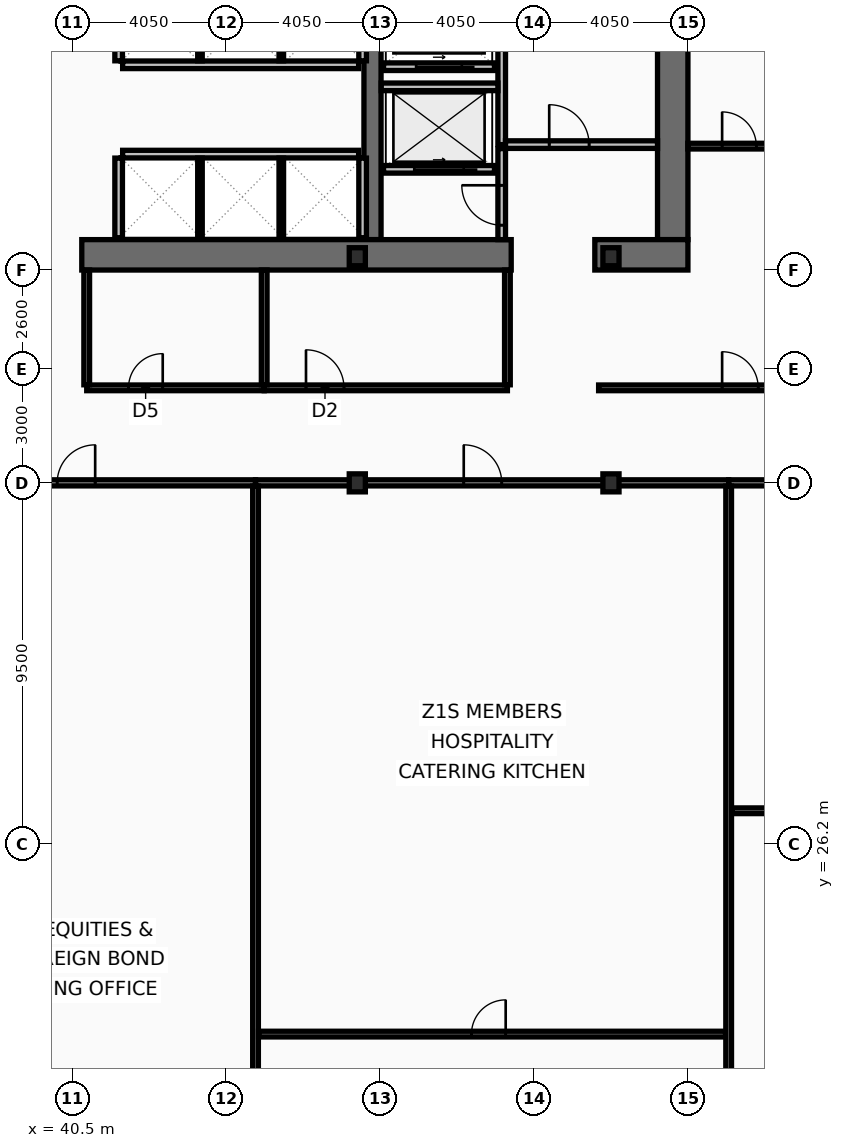
"""IFC4 building model, lengths in metres.
Left out: names, types, materials, properties, quantities, classifications, styles, units other than length and angle.
Written with IfcOpenShell. Run it as: python <this file> out.ifc"""

import sys

from ifc_helpers import new_model, si_unit, direction, frame, frame_2d, origin, origin_2d, place, context, subcontext, project, spatial, rectangle, i_section, extrude, element, fill, save


model = new_model("IFC4")
c1 = context("Model", 3, precision=1e-05, world=origin(), true_north=direction((0.0, 1.0)))
c2 = subcontext(c1, "Body", "Model", "MODEL_VIEW")
j1 = project(units=[si_unit("LENGTHUNIT", "METRE"), si_unit("PLANEANGLEUNIT", "RADIAN")], contexts=[c1])
p1 = place(None, origin())
s1 = spatial("IfcSite", under=j1, at=p1, CompositionType="ELEMENT")
p2 = place(p1, origin())
s2 = spatial("IfcBuilding", under=s1, at=p2, CompositionType="ELEMENT")
p3 = place(p2, frame((0.0, 0.0, 37.8)))
s3 = spatial("IfcBuildingStorey", under=s2, at=p3, CompositionType="ELEMENT", Elevation=37.8)
p4 = place(p3, frame((56.3, 52.9, 0.0), z_axis=(0.0, 0.0, 1.0), x_axis=(0.0, -1.0, 0.0)))
e1 = element("IfcWall", 1, at=p4, inside=s3, PredefinedType="SHEAR", context=c2, shape_type="SweptSolid", body=[
    extrude(rectangle(XDim=10.8, YDim=0.8, at=frame_2d((5.4, 0.0))), origin(), (0.0, 0.0, 1.0), 3.82),
])
p5 = place(p3, frame((48.4, 42.1, 0.0), z_axis=(0.0, 0.0, 1.0), x_axis=(0.0, 1.0, 0.0)))
e2 = element("IfcWall", 2, at=p5, inside=s3, PredefinedType="SHEAR", context=c2, shape_type="SweptSolid", body=[
    extrude(rectangle(XDim=10.8, YDim=0.45, at=frame_2d((5.4, 0.0))), origin(), (0.0, 0.0, 1.0), 3.82),
])
p6 = place(p3, frame((52.05, 41.7, 0.0), z_axis=(0.0, 0.0, 1.0), x_axis=(-1.0, 0.0, 0.0)))
e3 = element("IfcWall", 3, at=p6, inside=s3, PredefinedType="SHEAR", context=c2, shape_type="SweptSolid", body=[
    extrude(rectangle(XDim=11.3, YDim=0.8, at=frame_2d((5.65, 0.0))), origin(), (0.0, 0.0, 1.0), 3.82),
])
p7 = place(p3, frame((56.7, 41.7, 0.0), z_axis=(0.0, 0.0, 1.0), x_axis=(-1.0, 0.0, 0.0)))
e4 = element("IfcWall", 4, at=p7, inside=s3, PredefinedType="SHEAR", context=c2, shape_type="SweptSolid", body=[
    extrude(rectangle(XDim=2.45, YDim=0.8, at=frame_2d((1.225, 0.0))), origin(), (0.0, 0.0, 1.0), 3.82),
])
for number, where, z_axis, x_axis in (
    (5, (48.0, 35.7, 0.0), (0.0, 0.0, 1.0), (1.0, 0.0, 0.0)),
    (6, (48.0, 41.65, 0.0), (0.0, 0.0, 1.0), (1.0, 0.0, 0.0)),
    (7, (54.675, 35.7, 0.0), (0.0, 0.0, 1.0), (1.0, 0.0, 0.0)),
    (8, (54.675, 41.65, 0.0), (0.0, 0.0, 1.0), (1.0, 0.0, 0.0)),
):
    element("IfcColumn", number, at=place(p3, frame(where, z_axis=z_axis, x_axis=x_axis)), inside=s3, PredefinedType="COLUMN", context=c2, shape_type="SweptSolid", body=[
        extrude(i_section(OverallWidth=0.424, OverallDepth=0.474, WebThickness=0.048, FlangeThickness=0.077, at=origin_2d()), origin(), (0.0, 0.0, 1.0), 4.0),
    ])
p8 = place(p3, frame((51.61, 43.95, 0.0), z_axis=(0.0, 0.0, 1.0), x_axis=(-1.0, 0.0, 0.0)))
e9 = element("IfcWall", 9, at=p8, inside=s3, PredefinedType="PARTITIONING", context=c2, shape_type="SweptSolid", body=[
    extrude(rectangle(XDim=2.92, YDim=0.2, at=frame_2d((1.46, 0.0))), origin(), (0.0, 0.0, 1.0), 3.82),
])
p9 = place(p8, frame((0.81, 0.0, 0.0)))
e10 = element("IfcOpeningElement", 10, at=p9, cuts=e9, PredefinedType="OPENING", context=c2, shape_type="SweptSolid", body=[
    extrude(rectangle(XDim=1.3, YDim=2.18, at=frame_2d((0.65, 1.09))), frame((0.0, 0.11, 0.0), z_axis=(0.0, -1.0, 0.0), x_axis=(1.0, 0.0, 0.0)), (0.0, 0.0, 1.0), 0.22),
])
p10 = place(p3, frame((51.61, 46.65, 0.0), z_axis=(0.0, 0.0, 1.0), x_axis=(-1.0, 0.0, 0.0)))
e11 = element("IfcWall", 11, at=p10, inside=s3, PredefinedType="PARTITIONING", context=c2, shape_type="SweptSolid", body=[
    extrude(rectangle(XDim=2.92, YDim=0.2, at=frame_2d((1.46, 0.0))), origin(), (0.0, 0.0, 1.0), 3.82),
])
p11 = place(p10, frame((0.86, 0.0, 0.0)))
e12 = element("IfcOpeningElement", 12, at=p11, cuts=e11, PredefinedType="OPENING", context=c2, shape_type="SweptSolid", body=[
    extrude(rectangle(XDim=1.2, YDim=2.18, at=frame_2d((0.6, 1.09))), frame((0.0, 0.11, 0.0), z_axis=(0.0, -1.0, 0.0), x_axis=(1.0, 0.0, 0.0)), (0.0, 0.0, 1.0), 0.22),
])
p12 = place(p3, frame((51.8, 44.6, 0.0), z_axis=(0.0, 0.0, 1.0), x_axis=(0.0, 1.0, 0.0)))
e13 = element("IfcWall", 13, at=p12, inside=s3, PredefinedType="PARTITIONING", context=c2, shape_type="SweptSolid", body=[
    extrude(rectangle(XDim=4.3, YDim=0.2, at=frame_2d((2.15, 0.0))), origin(), (0.0, 0.0, 1.0), 3.82),
])
p13 = place(p3, frame((51.9, 44.6, 0.0), z_axis=(0.0, 0.0, 1.0), x_axis=(1.0, 0.0, 0.0)))
e14 = element("IfcWall", 14, at=p13, inside=s3, PredefinedType="PARTITIONING", context=c2, shape_type="SweptSolid", body=[
    extrude(rectangle(XDim=4.0, YDim=0.2, at=frame_2d((2.0, 0.0))), origin(), (0.0, 0.0, 1.0), 3.82),
])
p14 = place(p13, frame((1.15, 0.0, 0.0)))
e15 = element("IfcOpeningElement", 15, at=p14, cuts=e14, PredefinedType="OPENING", context=c2, shape_type="SweptSolid", body=[
    extrude(rectangle(XDim=1.05, YDim=2.15, at=frame_2d((0.525, 1.075))), frame((0.0, 0.11, 0.0), z_axis=(0.0, -1.0, 0.0), x_axis=(1.0, 0.0, 0.0)), (0.0, 0.0, 1.0), 0.22),
])
p15 = place(p3, frame((48.63, 46.12, 0.0), z_axis=(0.0, 0.0, 1.0), x_axis=(1.0, 0.0, 0.0)))
e16 = element("IfcWall", 16, at=p15, inside=s3, PredefinedType="PARTITIONING", context=c2, shape_type="SweptSolid", body=[
    extrude(rectangle(XDim=3.07, YDim=0.2, at=frame_2d((1.535, 0.0))), origin(), (0.0, 0.0, 1.0), 3.82),
])
p16 = place(p3, frame((51.8, 42.1, 0.0), z_axis=(0.0, 0.0, 1.0), x_axis=(0.0, 1.0, 0.0)))
e17 = element("IfcWall", 17, at=p16, inside=s3, PredefinedType="PARTITIONING", context=c2, shape_type="SweptSolid", body=[
    extrude(rectangle(XDim=2.395, YDim=0.2, at=frame_2d((1.198, 0.0))), origin(), (0.0, 0.0, 1.0), 3.82),
])
p17 = place(p16, frame((0.38, 0.0, 0.0)))
e18 = element("IfcOpeningElement", 18, at=p17, cuts=e17, PredefinedType="OPENING", context=c2, shape_type="SweptSolid", body=[
    extrude(rectangle(XDim=1.05, YDim=2.15, at=frame_2d((0.525, 1.075))), frame((0.0, 0.11, 0.0), z_axis=(0.0, -1.0, 0.0), x_axis=(1.0, 0.0, 0.0)), (0.0, 0.0, 1.0), 0.22),
])
p18 = place(p3, frame((41.825, 46.7, 0.0), z_axis=(0.0, 0.0, 1.0), x_axis=(1.0, 0.0, 0.0)))
e19 = element("IfcWall", 19, at=p18, inside=s3, PredefinedType="PARTITIONING", context=c2, shape_type="SweptSolid", body=[
    extrude(rectangle(XDim=6.21, YDim=0.2, at=frame_2d((3.105, 0.0))), origin(), (0.0, 0.0, 1.0), 3.82),
])
for number, where, z_axis, x_axis in (
    (20, (41.72, 46.805, 0.0), (0.0, 0.0, 1.0), (0.0, 1.0, 0.0)),
    (21, (48.14, 46.805, 0.0), (0.0, 0.0, 1.0), (0.0, 1.0, 0.0)),
):
    element("IfcWall", number, at=place(p3, frame(where, z_axis=z_axis, x_axis=x_axis)), inside=s3, PredefinedType="PARTITIONING", context=c2, shape_type="SweptSolid", body=[
        extrude(rectangle(XDim=2.09, YDim=0.2, at=frame_2d((1.045, 0.0))), origin(), (0.0, 0.0, 1.0), 3.82),
    ])
for number, where, z_axis, x_axis in (
    (22, (43.86, 46.805, 0.0), (0.0, 0.0, 1.0), (0.0, 1.0, 0.0)),
    (23, (46.0, 46.805, 0.0), (0.0, 0.0, 1.0), (0.0, 1.0, 0.0)),
):
    element("IfcWall", number, at=place(p3, frame(where, z_axis=z_axis, x_axis=x_axis)), inside=s3, PredefinedType="PARTITIONING", context=c2, shape_type="SweptSolid", body=[
        extrude(rectangle(XDim=2.09, YDim=0.12, at=frame_2d((1.045, 0.0))), origin(), (0.0, 0.0, 1.0), 3.82),
    ])
p19 = place(p3, frame((41.825, 44.35, 0.0), z_axis=(0.0, 0.0, 1.0), x_axis=(1.0, 0.0, 0.0)))
e24 = element("IfcWall", 24, at=p19, inside=s3, PredefinedType="PARTITIONING", context=c2, shape_type="SweptSolid", body=[
    extrude(rectangle(XDim=6.21, YDim=0.2, at=frame_2d((3.105, 0.0))), origin(), (0.0, 0.0, 1.0), 3.82),
])
for number, where, z_axis, x_axis in (
    (25, (41.72, 42.15, 0.0), (0.0, 0.0, 1.0), (0.0, 1.0, 0.0)),
    (26, (48.14, 42.15, 0.0), (0.0, 0.0, 1.0), (0.0, 1.0, 0.0)),
):
    element("IfcWall", number, at=place(p3, frame(where, z_axis=z_axis, x_axis=x_axis)), inside=s3, PredefinedType="PARTITIONING", context=c2, shape_type="SweptSolid", body=[
        extrude(rectangle(XDim=2.095, YDim=0.2, at=frame_2d((1.048, 0.0))), origin(), (0.0, 0.0, 1.0), 3.82),
    ])
for number, where, z_axis, x_axis in (
    (27, (43.86, 42.15, 0.0), (0.0, 0.0, 1.0), (0.0, 1.0, 0.0)),
    (28, (46.0, 42.15, 0.0), (0.0, 0.0, 1.0), (0.0, 1.0, 0.0)),
):
    element("IfcWall", number, at=place(p3, frame(where, z_axis=z_axis, x_axis=x_axis)), inside=s3, PredefinedType="PARTITIONING", context=c2, shape_type="SweptSolid", body=[
        extrude(rectangle(XDim=2.095, YDim=0.12, at=frame_2d((1.048, 0.0))), origin(), (0.0, 0.0, 1.0), 3.82),
    ])
p20 = place(p3, frame((40.88, 38.2, 0.0), z_axis=(0.0, 0.0, 1.0), x_axis=(1.0, 0.0, 0.0)))
e29 = element("IfcWall", 29, at=p20, inside=s3, PredefinedType="PARTITIONING", context=c2, shape_type="SweptSolid", body=[
    extrude(rectangle(XDim=4.67, YDim=0.15, at=frame_2d((2.335, 0.0))), origin(), (0.0, 0.0, 1.0), 3.01),
])
p21 = place(p20, frame((1.1, 0.0, 0.0)))
e30 = element("IfcOpeningElement", 30, at=p21, cuts=e29, PredefinedType="OPENING", context=c2, shape_type="SweptSolid", body=[
    extrude(rectangle(XDim=0.9, YDim=2.05, at=frame_2d((0.45, 1.025))), frame((0.0, 0.085, 0.0), z_axis=(0.0, -1.0, 0.0), x_axis=(1.0, 0.0, 0.0)), (0.0, 0.0, 1.0), 0.17),
])
p22 = place(p3, frame((45.55, 38.2, 0.0), z_axis=(0.0, 0.0, 1.0), x_axis=(1.0, 0.0, 0.0)))
e31 = element("IfcWall", 31, at=p22, inside=s3, PredefinedType="PARTITIONING", context=c2, shape_type="SweptSolid", body=[
    extrude(rectangle(XDim=6.4, YDim=0.15, at=frame_2d((3.2, 0.0))), origin(), (0.0, 0.0, 1.0), 3.01),
])
p23 = place(p22, frame((1.1, 0.0, 0.0)))
e32 = element("IfcOpeningElement", 32, at=p23, cuts=e31, PredefinedType="OPENING", context=c2, shape_type="SweptSolid", body=[
    extrude(rectangle(XDim=1.0, YDim=2.05, at=frame_2d((0.5, 1.025))), frame((0.0, 0.085, 0.0), z_axis=(0.0, -1.0, 0.0), x_axis=(1.0, 0.0, 0.0)), (0.0, 0.0, 1.0), 0.17),
])
for number, where, z_axis, x_axis in (
    (33, (40.88, 38.28, 0.0), (0.0, 0.0, 1.0), (0.0, 1.0, 0.0)),
    (34, (45.55, 38.28, 0.0), (0.0, 0.0, 1.0), (0.0, 1.0, 0.0)),
    (35, (51.95, 38.28, 0.0), (0.0, 0.0, 1.0), (0.0, 1.0, 0.0)),
):
    element("IfcWall", number, at=place(p3, frame(where, z_axis=z_axis, x_axis=x_axis)), inside=s3, PredefinedType="PARTITIONING", context=c2, shape_type="SweptSolid", body=[
        extrude(rectangle(XDim=3.02, YDim=0.15, at=frame_2d((1.51, 0.0))), origin(), (0.0, 0.0, 1.0), 3.82),
    ])
p24 = place(p3, frame((54.35, 38.2, 0.0), z_axis=(0.0, 0.0, 1.0), x_axis=(1.0, 0.0, 0.0)))
e36 = element("IfcWall", 36, at=p24, inside=s3, PredefinedType="PARTITIONING", context=c2, shape_type="SweptSolid", body=[
    extrude(rectangle(XDim=16.52, YDim=0.15, at=frame_2d((8.26, 0.0))), origin(), (0.0, 0.0, 1.0), 3.01),
])
p25 = place(p24, frame((3.25, 0.0, 0.0)))
e37 = element("IfcOpeningElement", 37, at=p25, cuts=e36, PredefinedType="OPENING", context=c2, shape_type="SweptSolid", body=[
    extrude(rectangle(XDim=0.95, YDim=2.05, at=frame_2d((0.475, 1.025))), frame((0.0, 0.085, 0.0), z_axis=(0.0, -1.0, 0.0), x_axis=(1.0, 0.0, 0.0)), (0.0, 0.0, 1.0), 0.17),
])
p26 = place(p3, frame((56.7, 44.56, 0.0), z_axis=(0.0, 0.0, 1.0), x_axis=(1.0, 0.0, 0.0)))
e38 = element("IfcWall", 38, at=p26, inside=s3, PredefinedType="PARTITIONING", context=c2, shape_type="SweptSolid", body=[
    extrude(rectangle(XDim=14.105, YDim=0.15, at=frame_2d((7.052, 0.0))), origin(), (0.0, 0.0, 1.0), 3.16),
])
p27 = place(p26, frame((0.9, 0.0, 0.0)))
e39 = element("IfcOpeningElement", 39, at=p27, cuts=e38, PredefinedType="OPENING", context=c2, shape_type="SweptSolid", body=[
    extrude(rectangle(XDim=0.9, YDim=2.05, at=frame_2d((0.45, 1.025))), frame((0.0, 0.085, 0.0), z_axis=(0.0, -1.0, 0.0), x_axis=(1.0, 0.0, 0.0)), (0.0, 0.0, 1.0), 0.17),
])
p28 = place(p3, frame((35.892, 35.7, 0.0), z_axis=(0.0, 0.0, 1.0), x_axis=(1.0, 0.0, 0.0)))
e40 = element("IfcWall", 40, at=p28, inside=s3, PredefinedType="PARTITIONING", context=c2, shape_type="SweptSolid", body=[
    extrude(rectangle(XDim=9.43, YDim=0.16, at=frame_2d((4.715, 0.0))), origin(), (0.0, 0.0, 1.0), 3.01),
])
p29 = place(p28, frame((4.211, 0.0, 0.0)))
e41 = element("IfcOpeningElement", 41, at=p29, cuts=e40, PredefinedType="OPENING", context=c2, shape_type="SweptSolid", body=[
    extrude(rectangle(XDim=1.0, YDim=2.05, at=frame_2d((0.5, 1.025))), frame((0.0, 0.09, 0.0), z_axis=(0.0, -1.0, 0.0), x_axis=(1.0, 0.0, 0.0)), (0.0, 0.0, 1.0), 0.18),
])
p30 = place(p3, frame((45.322, 35.7, 0.0), z_axis=(0.0, 0.0, 1.0), x_axis=(1.0, 0.0, 0.0)))
e42 = element("IfcWall", 42, at=p30, inside=s3, PredefinedType="PARTITIONING", context=c2, shape_type="SweptSolid", body=[
    extrude(rectangle(XDim=12.45, YDim=0.16, at=frame_2d((6.225, 0.0))), origin(), (0.0, 0.0, 1.0), 3.01),
])
p31 = place(p30, frame((5.479, 0.0, 0.0)))
e43 = element("IfcOpeningElement", 43, at=p31, cuts=e42, PredefinedType="OPENING", context=c2, shape_type="SweptSolid", body=[
    extrude(rectangle(XDim=1.0, YDim=2.05, at=frame_2d((0.5, 1.025))), frame((0.0, 0.09, 0.0), z_axis=(0.0, -1.0, 0.0), x_axis=(1.0, 0.0, 0.0)), (0.0, 0.0, 1.0), 0.18),
])
p32 = place(p3, frame((45.322, 10.665, 0.0), z_axis=(0.0, 0.0, 1.0), x_axis=(0.0, 1.0, 0.0)))
e44 = element("IfcWall", 44, at=p32, inside=s3, PredefinedType="PARTITIONING", context=c2, shape_type="SweptSolid", body=[
    extrude(rectangle(XDim=24.95, YDim=0.15, at=frame_2d((12.475, 0.0))), origin(), (0.0, 0.0, 1.0), 3.21),
])
p33 = place(p3, frame((45.402, 21.196, 0.0), z_axis=(0.0, 0.0, 1.0), x_axis=(1.0, 0.0, 0.0)))
e45 = element("IfcWall", 45, at=p33, inside=s3, PredefinedType="PARTITIONING", context=c2, shape_type="SweptSolid", body=[
    extrude(rectangle(XDim=12.29, YDim=0.15, at=frame_2d((6.145, 0.0))), origin(), (0.0, 0.0, 1.0), 3.01),
])
p34 = place(p33, frame((5.603, 0.0, 0.0)))
e46 = element("IfcOpeningElement", 46, at=p34, cuts=e45, PredefinedType="OPENING", context=c2, shape_type="SweptSolid", body=[
    extrude(rectangle(XDim=0.9, YDim=2.05, at=frame_2d((0.45, 1.025))), frame((0.0, 0.085, 0.0), z_axis=(0.0, -1.0, 0.0), x_axis=(1.0, 0.0, 0.0)), (0.0, 0.0, 1.0), 0.17),
])
p35 = place(p3, frame((57.772, 35.7, 0.0), z_axis=(0.0, 0.0, 1.0), x_axis=(1.0, 0.0, 0.0)))
e47 = element("IfcWall", 47, at=p35, inside=s3, PredefinedType="PARTITIONING", context=c2, shape_type="SweptSolid", body=[
    extrude(rectangle(XDim=13.098, YDim=0.16, at=frame_2d((6.549, 0.0))), origin(), (0.0, 0.0, 1.0), 3.01),
])
p36 = place(p35, frame((5.751, 0.0, 0.0)))
e48 = element("IfcOpeningElement", 48, at=p36, cuts=e47, PredefinedType="OPENING", context=c2, shape_type="SweptSolid", body=[
    extrude(rectangle(XDim=1.0, YDim=2.05, at=frame_2d((0.5, 1.025))), frame((0.0, 0.09, 0.0), z_axis=(0.0, -1.0, 0.0), x_axis=(1.0, 0.0, 0.0)), (0.0, 0.0, 1.0), 0.18),
])
p37 = place(p3, frame((57.772, 10.665, 0.0), z_axis=(0.0, 0.0, 1.0), x_axis=(0.0, 1.0, 0.0)))
e49 = element("IfcWall", 49, at=p37, inside=s3, PredefinedType="PARTITIONING", context=c2, shape_type="SweptSolid", body=[
    extrude(rectangle(XDim=24.95, YDim=0.15, at=frame_2d((12.475, 0.0))), origin(), (0.0, 0.0, 1.0), 3.01),
])
p38 = place(p3, frame((57.852, 27.072, 0.0), z_axis=(0.0, 0.0, 1.0), x_axis=(1.0, 0.0, 0.0)))
e50 = element("IfcWall", 50, at=p38, inside=s3, PredefinedType="PARTITIONING", context=c2, shape_type="SweptSolid", body=[
    extrude(rectangle(XDim=12.953, YDim=0.15, at=frame_2d((6.477, 0.0))), origin(), (0.0, 0.0, 1.0), 3.82),
])
p39 = place(p38, frame((5.894, 0.0, 0.0)))
e51 = element("IfcOpeningElement", 51, at=p39, cuts=e50, PredefinedType="OPENING", context=c2, shape_type="SweptSolid", body=[
    extrude(rectangle(XDim=0.9, YDim=2.05, at=frame_2d((0.45, 1.025))), frame((0.0, 0.085, 0.0), z_axis=(0.0, -1.0, 0.0), x_axis=(1.0, 0.0, 0.0)), (0.0, 0.0, 1.0), 0.17),
])
p40 = place(p9, origin())
e52 = element("IfcDoor", 52, at=p40, inside=s3, OperationType="SLIDING_TO_LEFT", PredefinedType="DOOR", context=c2, shape_type="SweptSolid", body=[
    extrude(rectangle(XDim=1.3, YDim=2.18, at=frame_2d((0.65, 1.09))), frame((0.0, 0.025, 0.0), z_axis=(0.0, -1.0, 0.0), x_axis=(1.0, 0.0, 0.0)), (0.0, 0.0, 1.0), 0.05),
])
fill(e10, e52)
p41 = place(p11, origin())
e53 = element("IfcDoor", 53, at=p41, inside=s3, OperationType="SLIDING_TO_LEFT", PredefinedType="DOOR", context=c2, shape_type="SweptSolid", body=[
    extrude(rectangle(XDim=1.2, YDim=2.18, at=frame_2d((0.6, 1.09))), frame((0.0, 0.025, 0.0), z_axis=(0.0, -1.0, 0.0), x_axis=(1.0, 0.0, 0.0)), (0.0, 0.0, 1.0), 0.05),
])
fill(e12, e53)
p42 = place(p14, origin())
e54 = element("IfcDoor", 54, at=p42, inside=s3, OperationType="SINGLE_SWING_LEFT", PredefinedType="DOOR", context=c2, shape_type="SweptSolid", body=[
    extrude(rectangle(XDim=1.05, YDim=2.15, at=frame_2d((0.525, 1.075))), frame((0.0, 0.025, 0.0), z_axis=(0.0, -1.0, 0.0), x_axis=(1.0, 0.0, 0.0)), (0.0, 0.0, 1.0), 0.05),
])
fill(e15, e54)
p43 = place(p17, origin())
e55 = element("IfcDoor", 55, at=p43, inside=s3, OperationType="SINGLE_SWING_RIGHT", PredefinedType="DOOR", context=c2, shape_type="SweptSolid", body=[
    extrude(rectangle(XDim=1.05, YDim=2.15, at=frame_2d((0.525, 1.075))), frame((0.0, 0.025, 0.0), z_axis=(0.0, -1.0, 0.0), x_axis=(1.0, 0.0, 0.0)), (0.0, 0.0, 1.0), 0.05),
])
fill(e18, e55)
p44 = place(p21, origin())
e56 = element("IfcDoor", 56, at=p44, inside=s3, OperationType="SINGLE_SWING_RIGHT", PredefinedType="DOOR", context=c2, shape_type="SweptSolid", body=[
    extrude(rectangle(XDim=0.9, YDim=2.05, at=frame_2d((0.45, 1.025))), frame((0.0, 0.025, 0.0), z_axis=(0.0, -1.0, 0.0), x_axis=(1.0, 0.0, 0.0)), (0.0, 0.0, 1.0), 0.05),
])
fill(e30, e56)
p45 = place(p23, origin())
e57 = element("IfcDoor", 57, at=p45, inside=s3, OperationType="SINGLE_SWING_LEFT", PredefinedType="DOOR", context=c2, shape_type="SweptSolid", body=[
    extrude(rectangle(XDim=1.0, YDim=2.05, at=frame_2d((0.5, 1.025))), frame((0.0, 0.025, 0.0), z_axis=(0.0, -1.0, 0.0), x_axis=(1.0, 0.0, 0.0)), (0.0, 0.0, 1.0), 0.05),
])
fill(e32, e57)
p46 = place(p25, origin())
e58 = element("IfcDoor", 58, at=p46, inside=s3, OperationType="SINGLE_SWING_LEFT", PredefinedType="DOOR", context=c2, shape_type="SweptSolid", body=[
    extrude(rectangle(XDim=0.95, YDim=2.05, at=frame_2d((0.475, 1.025))), frame((0.0, 0.025, 0.0), z_axis=(0.0, -1.0, 0.0), x_axis=(1.0, 0.0, 0.0)), (0.0, 0.0, 1.0), 0.05),
])
fill(e37, e58)
p47 = place(p27, origin())
e59 = element("IfcDoor", 59, at=p47, inside=s3, OperationType="SINGLE_SWING_LEFT", PredefinedType="DOOR", context=c2, shape_type="SweptSolid", body=[
    extrude(rectangle(XDim=0.9, YDim=2.05, at=frame_2d((0.45, 1.025))), frame((0.0, 0.025, 0.0), z_axis=(0.0, -1.0, 0.0), x_axis=(1.0, 0.0, 0.0)), (0.0, 0.0, 1.0), 0.05),
])
fill(e39, e59)
p48 = place(p29, origin())
e60 = element("IfcDoor", 60, at=p48, inside=s3, OperationType="SINGLE_SWING_RIGHT", PredefinedType="DOOR", context=c2, shape_type="SweptSolid", body=[
    extrude(rectangle(XDim=1.0, YDim=2.05, at=frame_2d((0.5, 1.025))), frame((0.0, 0.025, 0.0), z_axis=(0.0, -1.0, 0.0), x_axis=(1.0, 0.0, 0.0)), (0.0, 0.0, 1.0), 0.05),
])
fill(e41, e60)
p49 = place(p31, origin())
e61 = element("IfcDoor", 61, at=p49, inside=s3, OperationType="SINGLE_SWING_LEFT", PredefinedType="DOOR", context=c2, shape_type="SweptSolid", body=[
    extrude(rectangle(XDim=1.0, YDim=2.05, at=frame_2d((0.5, 1.025))), frame((0.0, 0.025, 0.0), z_axis=(0.0, -1.0, 0.0), x_axis=(1.0, 0.0, 0.0)), (0.0, 0.0, 1.0), 0.05),
])
fill(e43, e61)
p50 = place(p34, origin())
e62 = element("IfcDoor", 62, at=p50, inside=s3, OperationType="SINGLE_SWING_RIGHT", PredefinedType="DOOR", context=c2, shape_type="SweptSolid", body=[
    extrude(rectangle(XDim=0.9, YDim=2.05, at=frame_2d((0.45, 1.025))), frame((0.0, 0.025, 0.0), z_axis=(0.0, -1.0, 0.0), x_axis=(1.0, 0.0, 0.0)), (0.0, 0.0, 1.0), 0.05),
])
fill(e46, e62)
save(model, sys.argv[1])
